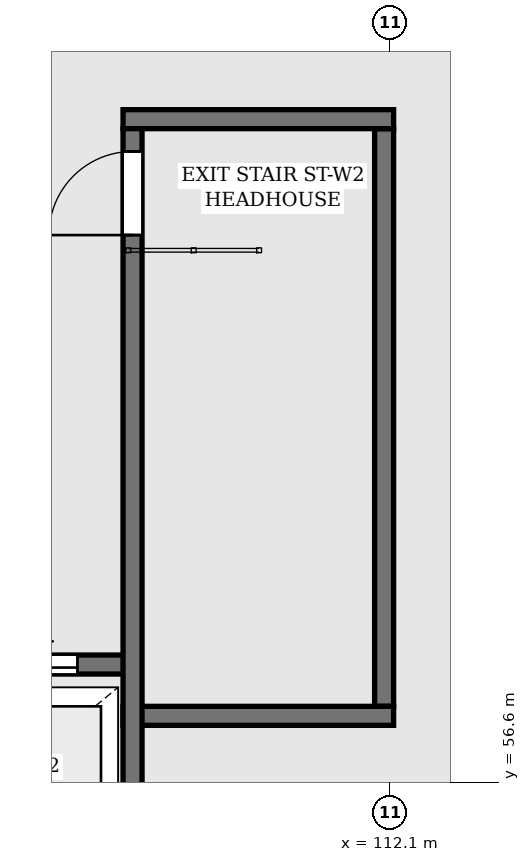
"""IFC4 building model, lengths in metres.
Left out: names, types, materials, properties, quantities, classifications, styles, units other than length and angle.
Written with IfcOpenShell. Run it as: python <this file> out.ifc"""

import sys

from ifc_helpers import new_model, si_unit, direction, frame, frame_2d, origin, place, context, subcontext, project, spatial, rectangle, extrude, element, fill, save


model = new_model("IFC4")
c1 = context("Model", 3, precision=1e-05, world=origin(), true_north=direction((0.0, 1.0)))
c2 = subcontext(c1, "Body", "Model", "MODEL_VIEW")
j1 = project(units=[si_unit("LENGTHUNIT", "METRE"), si_unit("PLANEANGLEUNIT", "RADIAN")], contexts=[c1])
p1 = place(None, origin())
s1 = spatial("IfcSite", under=j1, at=p1, CompositionType="ELEMENT")
p2 = place(p1, origin())
s2 = spatial("IfcBuilding", under=s1, at=p2, CompositionType="ELEMENT")
p3 = place(p2, frame((0.0, 0.0, 264.2)))
s3 = spatial("IfcBuildingStorey", under=s2, at=p3, CompositionType="ELEMENT", Elevation=264.2)
p4 = place(p3, frame((106.22, 58.15, 0.0), z_axis=(0.0, 0.0, 1.0), x_axis=(1.0, 0.0, 0.0)))
e1 = element("IfcWall", 1, at=p4, inside=s3, PredefinedType="SHEAR", context=c2, shape_type="SweptSolid", body=[
    extrude(rectangle(XDim=2.46, YDim=0.25, at=frame_2d((1.23, 0.0))), origin(), (0.0, 0.0, 1.0), 16.992),
])
p5 = place(p4, frame((0.65, 0.0, 0.0)))
e2 = element("IfcOpeningElement", 2, at=p5, cuts=e1, PredefinedType="OPENING", context=c2, shape_type="SweptSolid", body=[
    extrude(rectangle(XDim=1.12, YDim=2.12, at=frame_2d((0.56, 1.06))), frame((0.0, 0.135, 0.0), z_axis=(0.0, -1.0, 0.0), x_axis=(1.0, 0.0, 0.0)), (0.0, 0.0, 1.0), 0.27),
])
p6 = place(p3, frame((112.025, 57.6, 0.0), z_axis=(0.0, 0.0, 1.0), x_axis=(0.0, 1.0, 0.0)))
e3 = element("IfcWall", 3, at=p6, inside=s3, PredefinedType="SHEAR", context=c2, shape_type="SweptSolid", body=[
    extrude(rectangle(XDim=7.6, YDim=0.25, at=frame_2d((3.8, 0.0))), origin(), (0.0, 0.0, 1.0), 17.208),
])
for number, where, z_axis, x_axis in (
    (4, (108.59, 57.475, 0.0), (0.0, 0.0, 1.0), (1.0, 0.0, 0.0)),
    (5, (108.59, 65.325, 0.0), (0.0, 0.0, 1.0), (1.0, 0.0, 0.0)),
):
    element("IfcWall", number, at=place(p3, frame(where, z_axis=z_axis, x_axis=x_axis)), inside=s3, PredefinedType="SHEAR", context=c2, shape_type="SweptSolid", body=[
        extrude(rectangle(XDim=3.56, YDim=0.25, at=frame_2d((1.78, 0.0))), origin(), (0.0, 0.0, 1.0), 17.08),
    ])
p7 = place(p3, frame((108.715, 55.55, 0.0), z_axis=(0.0, 0.0, 1.0), x_axis=(0.0, 1.0, 0.0)))
e6 = element("IfcWall", 6, at=p7, inside=s3, PredefinedType="SHEAR", context=c2, shape_type="SweptSolid", body=[
    extrude(rectangle(XDim=9.65, YDim=0.25, at=frame_2d((4.825, 0.0))), origin(), (0.0, 0.0, 1.0), 17.085),
])
p8 = place(p7, frame((8.25, 0.0, 0.0)))
e7 = element("IfcOpeningElement", 7, at=p8, cuts=e6, PredefinedType="OPENING", context=c2, shape_type="SweptSolid", body=[
    extrude(rectangle(XDim=1.1, YDim=2.1, at=frame_2d((0.55, 1.05))), frame((0.0, 0.135, 0.0), z_axis=(0.0, -1.0, 0.0), x_axis=(1.0, 0.0, 0.0)), (0.0, 0.0, 1.0), 0.27),
])
p9 = place(p5, origin())
e8 = element("IfcDoor", 8, at=p9, inside=s3, OperationType="SLIDING_TO_RIGHT", PredefinedType="DOOR", context=c2, shape_type="SweptSolid", body=[
    extrude(rectangle(XDim=1.12, YDim=2.12, at=frame_2d((0.56, 1.06))), frame((0.0, 0.025, 0.0), z_axis=(0.0, -1.0, 0.0), x_axis=(1.0, 0.0, 0.0)), (0.0, 0.0, 1.0), 0.05),
])
fill(e2, e8)
p10 = place(p8, origin())
e9 = element("IfcDoor", 9, at=p10, inside=s3, OperationType="SINGLE_SWING_LEFT", PredefinedType="DOOR", context=c2, shape_type="SweptSolid", body=[
    extrude(rectangle(XDim=1.1, YDim=2.1, at=frame_2d((0.55, 1.05))), frame((0.0, 0.025, 0.0), z_axis=(0.0, -1.0, 0.0), x_axis=(1.0, 0.0, 0.0)), (0.0, 0.0, 1.0), 0.05),
])
fill(e7, e9)
save(model, sys.argv[1])
